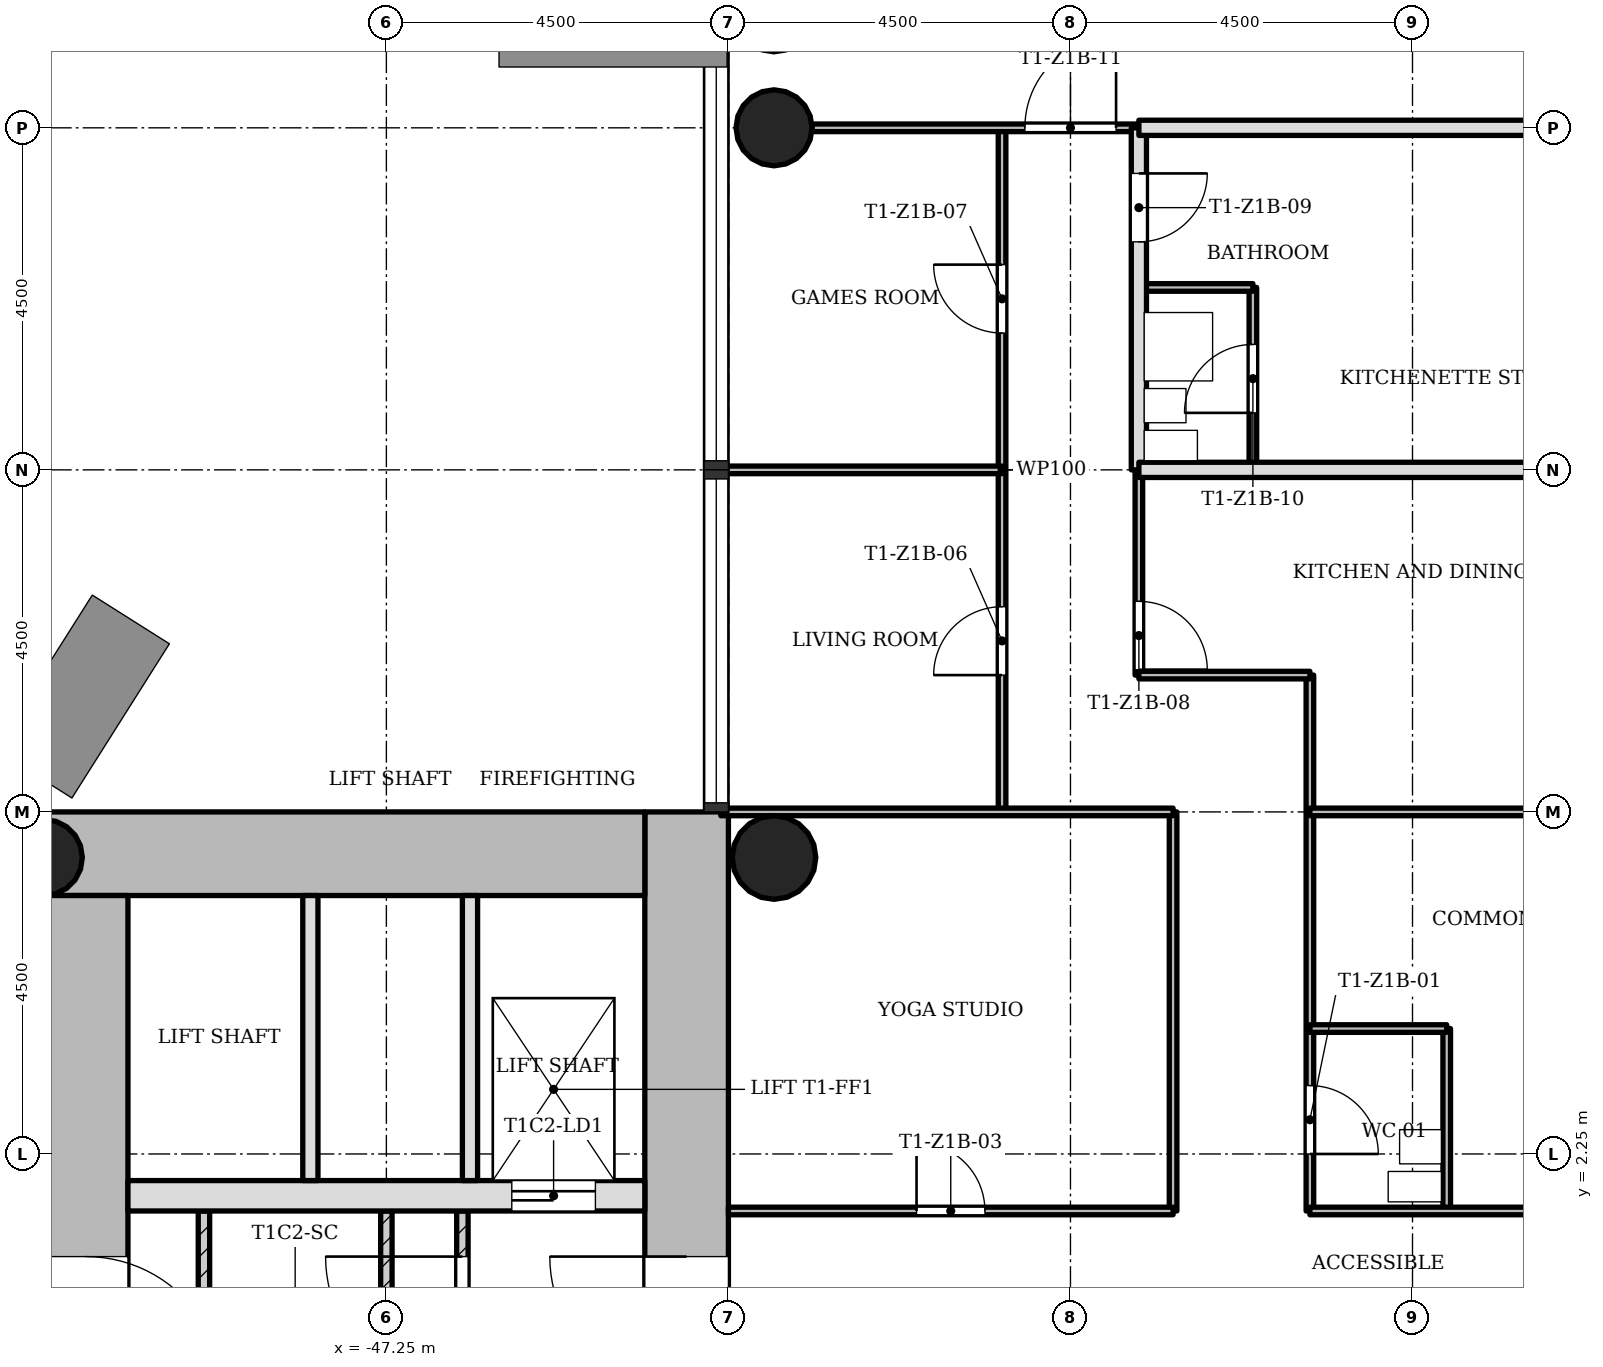
"""IFC4 building model, lengths in metres.
Left out: names, types, materials, properties, quantities, classifications, styles, units other than length and angle.
Written with IfcOpenShell. Run it as: python <this file> out.ifc"""

import sys

from ifc_helpers import new_model, si_unit, direction, frame, frame_2d, origin, origin_2d, place, context, subcontext, project, spatial, rectangle, hollow_circle, extrude, element, fill, save


model = new_model("IFC4")
c1 = context("Model", 3, precision=1e-05, world=origin(), true_north=direction((0.0, 1.0)))
c2 = subcontext(c1, "Body", "Model", "MODEL_VIEW")
j1 = project(units=[si_unit("LENGTHUNIT", "METRE"), si_unit("PLANEANGLEUNIT", "RADIAN")], contexts=[c1])
p1 = place(None, origin())
s1 = spatial("IfcSite", under=j1, at=p1, CompositionType="ELEMENT")
p2 = place(p1, origin())
s2 = spatial("IfcBuilding", under=s1, at=p2, CompositionType="ELEMENT")
p3 = place(p2, frame((0.0, 0.0, 38.1)))
s3 = spatial("IfcBuildingStorey", under=s2, at=p3, CompositionType="ELEMENT", Elevation=38.1)
p4 = place(p3, frame((-43.3, -5.65, 0.0), z_axis=(0.0, 0.0, 1.0), x_axis=(0.0, 1.0, 0.0)))
e1 = element("IfcWall", 1, at=p4, inside=s3, PredefinedType="SHEAR", context=c2, shape_type="SweptSolid", body=[
    extrude(rectangle(XDim=12.4, YDim=1.1, at=frame_2d((6.2, 0.0))), origin(), (0.0, 0.0, 1.0), 3.4),
])
p5 = place(p4, frame((4.75, 0.0, 0.0)))
e2 = element("IfcOpeningElement", 2, at=p5, cuts=e1, PredefinedType="OPENING", context=c2, shape_type="SweptSolid", body=[
    extrude(rectangle(XDim=1.8, YDim=2.1, at=frame_2d((0.9, 1.05))), frame((0.0, 0.56, 0.0), z_axis=(0.0, -1.0, 0.0), x_axis=(1.0, 0.0, 0.0)), (0.0, 0.0, 1.0), 1.12),
])
p6 = place(p3, frame((-43.85, 6.2, 0.0), z_axis=(0.0, 0.0, 1.0), x_axis=(-1.0, 0.0, 0.0)))
e3 = element("IfcWall", 3, at=p6, inside=s3, PredefinedType="SHEAR", context=c2, shape_type="SweptSolid", body=[
    extrude(rectangle(XDim=7.9, YDim=1.1, at=frame_2d((3.95, 0.0))), origin(), (0.0, 0.0, 1.0), 3.4),
])
p7 = place(p3, frame((-51.2, 5.65, 0.0), z_axis=(0.0, 0.0, 1.0), x_axis=(0.0, -1.0, 0.0)))
e4 = element("IfcWall", 4, at=p7, inside=s3, PredefinedType="SHEAR", context=c2, shape_type="SweptSolid", body=[
    extrude(rectangle(XDim=12.4, YDim=1.1, at=frame_2d((6.2, 0.0))), origin(), (0.0, 0.0, 1.0), 3.4),
])
p8 = place(p7, frame((4.75, 0.0, 0.0)))
e5 = element("IfcOpeningElement", 5, at=p8, cuts=e4, PredefinedType="OPENING", context=c2, shape_type="SweptSolid", body=[
    extrude(rectangle(XDim=1.8, YDim=2.1, at=frame_2d((0.9, 1.05))), frame((0.0, 0.56, 0.0), z_axis=(0.0, -1.0, 0.0), x_axis=(1.0, 0.0, 0.0)), (0.0, 0.0, 1.0), 1.12),
])
p9 = place(p3, frame((-50.65, 1.7, 0.0), z_axis=(0.0, 0.0, 1.0), x_axis=(1.0, 0.0, 0.0)))
e6 = element("IfcWall", 6, at=p9, inside=s3, PredefinedType="SHEAR", context=c2, shape_type="SweptSolid", body=[
    extrude(rectangle(XDim=6.8, YDim=0.4, at=frame_2d((3.4, 0.0))), origin(), (0.0, 0.0, 1.0), 3.4),
])
p10 = place(p9, frame((5.05, 0.0, 0.0)))
e7 = element("IfcOpeningElement", 7, at=p10, cuts=e6, PredefinedType="OPENING", context=c2, shape_type="SweptSolid", body=[
    extrude(rectangle(XDim=1.1, YDim=2.1, at=frame_2d((0.55, 1.05))), frame((0.0, 0.21, 0.0), z_axis=(0.0, -1.0, 0.0), x_axis=(1.0, 0.0, 0.0)), (0.0, 0.0, 1.0), 0.42),
])
for number, where, z_axis, x_axis in (
    (8, (-42.15, 15.75, 0.0), (0.0, 0.0, 1.0), (1.0, 0.0, 0.0)),
    (9, (-51.75, 6.15, 0.0), (0.0, 0.0, 1.0), (1.0, 0.0, 0.0)),
):
    element("IfcColumn", number, at=place(p3, frame(where, z_axis=z_axis, x_axis=x_axis)), inside=s3, PredefinedType="COLUMN", context=c2, shape_type="SweptSolid", body=[
        extrude(hollow_circle(Radius=0.5, WallThickness=0.036, at=origin_2d()), origin(), (0.0, 0.0, 1.0), 3.4),
    ])
p11 = place(p3, frame((-42.15, 6.15, 0.0), z_axis=(0.0, 0.0, 1.0), x_axis=(1.0, 0.0, 0.0)))
e10 = element("IfcColumn", 10, at=p11, inside=s3, PredefinedType="COLUMN", context=c2, shape_type="SweptSolid", body=[
    extrude(hollow_circle(Radius=0.55, WallThickness=0.04, at=origin_2d()), origin(), (0.0, 0.0, 1.0), 3.4),
])
p12 = place(p3, frame((-46.25, 1.5, 0.0), z_axis=(0.0, 0.0, 1.0), x_axis=(0.0, -1.0, 0.0)))
e11 = element("IfcWall", 11, at=p12, inside=s3, PredefinedType="PARTITIONING", context=c2, shape_type="SweptSolid", body=[
    extrude(rectangle(XDim=3.0, YDim=0.15, at=frame_2d((1.5, 0.0))), origin(), (0.0, 0.0, 1.0), 3.0),
])
p13 = place(p12, frame((0.6, 0.0, 0.0)))
e12 = element("IfcOpeningElement", 12, at=p13, cuts=e11, PredefinedType="OPENING", context=c2, shape_type="SweptSolid", body=[
    extrude(rectangle(XDim=1.8, YDim=2.1, at=frame_2d((0.9, 1.05))), frame((0.0, 0.085, 0.0), z_axis=(0.0, -1.0, 0.0), x_axis=(1.0, 0.0, 0.0)), (0.0, 0.0, 1.0), 0.17),
])
for number, where, z_axis, x_axis in (
    (13, (-46.15, 5.65, 0.0), (0.0, 0.0, 1.0), (0.0, -1.0, 0.0)),
    (14, (-48.25, 5.65, 0.0), (0.0, 0.0, 1.0), (0.0, -1.0, 0.0)),
):
    element("IfcWall", number, at=place(p3, frame(where, z_axis=z_axis, x_axis=x_axis)), inside=s3, PredefinedType="SOLIDWALL", context=c2, shape_type="SweptSolid", body=[
        extrude(rectangle(XDim=3.75, YDim=0.2, at=frame_2d((1.875, 0.0))), origin(), (0.0, 0.0, 1.0), 3.0),
    ])
for number, where, z_axis, x_axis in (
    (15, (-47.25, 0.3, 0.0), (0.0, 0.0, 1.0), (0.0, 1.0, 0.0)),
    (16, (-49.65, 0.3, 0.0), (0.0, 0.0, 1.0), (0.0, 1.0, 0.0)),
):
    element("IfcWall", number, at=place(p3, frame(where, z_axis=z_axis, x_axis=x_axis)), inside=s3, PredefinedType="PARTITIONING", context=c2, shape_type="SweptSolid", body=[
        extrude(rectangle(XDim=1.2, YDim=0.15, at=frame_2d((0.6, 0.0))), origin(), (0.0, 0.0, 1.0), 3.0),
    ])
p14 = place(p3, frame((-39.15, 6.75, 0.0), z_axis=(0.0, 0.0, 1.0), x_axis=(0.0, 1.0, 0.0)))
e17 = element("IfcWall", 17, at=p14, inside=s3, PredefinedType="PARTITIONING", context=c2, shape_type="SweptSolid", body=[
    extrude(rectangle(XDim=9.0, YDim=0.1, at=frame_2d((4.5, 0.0))), origin(), (0.0, 0.0, 1.0), 3.0),
])
p15 = place(p14, frame((1.8, 0.0, 0.0)))
e18 = element("IfcOpeningElement", 18, at=p15, cuts=e17, PredefinedType="OPENING", context=c2, shape_type="SweptSolid", body=[
    extrude(rectangle(XDim=0.9, YDim=2.1, at=frame_2d((0.45, 1.05))), frame((0.0, 0.06, 0.0), z_axis=(0.0, -1.0, 0.0), x_axis=(1.0, 0.0, 0.0)), (0.0, 0.0, 1.0), 0.12),
])
p16 = place(p14, frame((6.3, 0.0, 0.0)))
e19 = element("IfcOpeningElement", 19, at=p16, cuts=e17, PredefinedType="OPENING", context=c2, shape_type="SweptSolid", body=[
    extrude(rectangle(XDim=0.9, YDim=2.1, at=frame_2d((0.45, 1.05))), frame((0.0, 0.06, 0.0), z_axis=(0.0, -1.0, 0.0), x_axis=(1.0, 0.0, 0.0)), (0.0, 0.0, 1.0), 0.12),
])
p17 = place(p3, frame((-37.35, 8.55, 0.0), z_axis=(0.0, 0.0, 1.0), x_axis=(0.0, 1.0, 0.0)))
e20 = element("IfcWall", 20, at=p17, inside=s3, PredefinedType="PARTITIONING", context=c2, shape_type="SweptSolid", body=[
    extrude(rectangle(XDim=2.7, YDim=0.1, at=frame_2d((1.35, 0.0))), origin(), (0.0, 0.0, 1.0), 3.0),
])
p18 = place(p17, frame((0.07, 0.0, 0.0)))
e21 = element("IfcOpeningElement", 21, at=p18, cuts=e20, PredefinedType="OPENING", context=c2, shape_type="SweptSolid", body=[
    extrude(rectangle(XDim=0.9, YDim=2.1, at=frame_2d((0.45, 1.05))), frame((0.0, 0.06, 0.0), z_axis=(0.0, -1.0, 0.0), x_axis=(1.0, 0.0, 0.0)), (0.0, 0.0, 1.0), 0.12),
])
p19 = place(p3, frame((-37.35, 11.25, 0.0), z_axis=(0.0, 0.0, 1.0), x_axis=(0.0, 1.0, 0.0)))
e22 = element("IfcWall", 22, at=p19, inside=s3, PredefinedType="SOLIDWALL", context=c2, shape_type="SweptSolid", body=[
    extrude(rectangle(XDim=4.5, YDim=0.2, at=frame_2d((2.25, 0.0))), origin(), (0.0, 0.0, 1.0), 3.0),
])
p20 = place(p19, frame((3.0, 0.0, 0.0)))
e23 = element("IfcOpeningElement", 23, at=p20, cuts=e22, PredefinedType="OPENING", context=c2, shape_type="SweptSolid", body=[
    extrude(rectangle(XDim=0.9, YDim=2.1, at=frame_2d((0.45, 1.05))), frame((0.0, 0.11, 0.0), z_axis=(0.0, -1.0, 0.0), x_axis=(1.0, 0.0, 0.0)), (0.0, 0.0, 1.0), 0.22),
])
p21 = place(p3, frame((-36.9, 1.5, 0.0), z_axis=(0.0, 0.0, 1.0), x_axis=(0.0, 1.0, 0.0)))
e24 = element("IfcWall", 24, at=p21, inside=s3, PredefinedType="PARTITIONING", context=c2, shape_type="SweptSolid", body=[
    extrude(rectangle(XDim=5.25, YDim=0.1, at=frame_2d((2.625, 0.0))), origin(), (0.0, 0.0, 1.0), 3.0),
])
p22 = place(p3, frame((-35.85, 11.25, 0.0), z_axis=(0.0, 0.0, 1.0), x_axis=(0.0, 1.0, 0.0)))
e25 = element("IfcWall", 25, at=p22, inside=s3, PredefinedType="PARTITIONING", context=c2, shape_type="SweptSolid", body=[
    extrude(rectangle(XDim=2.4, YDim=0.1, at=frame_2d((1.2, 0.0))), origin(), (0.0, 0.0, 1.0), 3.0),
])
p23 = place(p22, frame((0.75, 0.0, 0.0)))
e26 = element("IfcOpeningElement", 26, at=p23, cuts=e25, PredefinedType="OPENING", context=c2, shape_type="SweptSolid", body=[
    extrude(rectangle(XDim=0.9, YDim=2.1, at=frame_2d((0.45, 1.05))), frame((0.0, 0.06, 0.0), z_axis=(0.0, -1.0, 0.0), x_axis=(1.0, 0.0, 0.0)), (0.0, 0.0, 1.0), 0.12),
])
p24 = place(p3, frame((-35.1, 1.5, 0.0), z_axis=(0.0, 0.0, 1.0), x_axis=(0.0, 1.0, 0.0)))
e27 = element("IfcWall", 27, at=p24, inside=s3, PredefinedType="PARTITIONING", context=c2, shape_type="SweptSolid", body=[
    extrude(rectangle(XDim=7.05, YDim=0.1, at=frame_2d((3.525, 0.0))), origin(), (0.0, 0.0, 1.0), 3.0),
])
p25 = place(p24, frame((0.75, 0.0, 0.0)))
e28 = element("IfcOpeningElement", 28, at=p25, cuts=e27, PredefinedType="OPENING", context=c2, shape_type="SweptSolid", body=[
    extrude(rectangle(XDim=0.9, YDim=2.1, at=frame_2d((0.45, 1.05))), frame((0.0, 0.06, 0.0), z_axis=(0.0, -1.0, 0.0), x_axis=(1.0, 0.0, 0.0)), (0.0, 0.0, 1.0), 0.12),
])
p26 = place(p3, frame((-33.3, 1.5, 0.0), z_axis=(0.0, 0.0, 1.0), x_axis=(0.0, 1.0, 0.0)))
e29 = element("IfcWall", 29, at=p26, inside=s3, PredefinedType="PARTITIONING", context=c2, shape_type="SweptSolid", body=[
    extrude(rectangle(XDim=2.4, YDim=0.1, at=frame_2d((1.2, 0.0))), origin(), (0.0, 0.0, 1.0), 3.0),
])
p27 = place(p3, frame((-42.75, 1.5, 0.0), z_axis=(0.0, 0.0, 1.0), x_axis=(1.0, 0.0, 0.0)))
e30 = element("IfcWall", 30, at=p27, inside=s3, PredefinedType="PARTITIONING", context=c2, shape_type="SweptSolid", body=[
    extrude(rectangle(XDim=5.85, YDim=0.1, at=frame_2d((2.925, 0.0))), origin(), (0.0, 0.0, 1.0), 3.0),
])
p28 = place(p27, frame((2.475, 0.0, 0.0)))
e31 = element("IfcOpeningElement", 31, at=p28, cuts=e30, PredefinedType="OPENING", context=c2, shape_type="SweptSolid", body=[
    extrude(rectangle(XDim=0.9, YDim=2.1, at=frame_2d((0.45, 1.05))), frame((0.0, 0.06, 0.0), z_axis=(0.0, -1.0, 0.0), x_axis=(1.0, 0.0, 0.0)), (0.0, 0.0, 1.0), 0.12),
])
p29 = place(p3, frame((-35.1, 1.5, 0.0), z_axis=(0.0, 0.0, 1.0), x_axis=(1.0, 0.0, 0.0)))
e32 = element("IfcWall", 32, at=p29, inside=s3, PredefinedType="PARTITIONING", context=c2, shape_type="SweptSolid", body=[
    extrude(rectangle(XDim=5.85, YDim=0.1, at=frame_2d((2.925, 0.0))), origin(), (0.0, 0.0, 1.0), 3.0),
])
p30 = place(p29, frame((3.375, 0.0, 0.0)))
e33 = element("IfcOpeningElement", 33, at=p30, cuts=e32, PredefinedType="OPENING", context=c2, shape_type="SweptSolid", body=[
    extrude(rectangle(XDim=0.9, YDim=2.1, at=frame_2d((0.45, 1.05))), frame((0.0, 0.06, 0.0), z_axis=(0.0, -1.0, 0.0), x_axis=(1.0, 0.0, 0.0)), (0.0, 0.0, 1.0), 0.12),
])
p31 = place(p3, frame((-35.1, 3.9, 0.0), z_axis=(0.0, 0.0, 1.0), x_axis=(1.0, 0.0, 0.0)))
e34 = element("IfcWall", 34, at=p31, inside=s3, PredefinedType="PARTITIONING", context=c2, shape_type="SweptSolid", body=[
    extrude(rectangle(XDim=1.8, YDim=0.1, at=frame_2d((0.9, 0.0))), origin(), (0.0, 0.0, 1.0), 3.0),
])
for number, where, z_axis, x_axis in (
    (35, (-42.85, 6.75, 0.0), (0.0, 0.0, 1.0), (1.0, 0.0, 0.0)),
    (36, (-35.1, 6.75, 0.0), (0.0, 0.0, 1.0), (1.0, 0.0, 0.0)),
):
    element("IfcWall", number, at=place(p3, frame(where, z_axis=z_axis, x_axis=x_axis)), inside=s3, PredefinedType="PARTITIONING", context=c2, shape_type="SweptSolid", body=[
        extrude(rectangle(XDim=5.95, YDim=0.1, at=frame_2d((2.975, 0.0))), origin(), (0.0, 0.0, 1.0), 3.0),
    ])
p32 = place(p3, frame((-37.35, 8.55, 0.0), z_axis=(0.0, 0.0, 1.0), x_axis=(1.0, 0.0, 0.0)))
e37 = element("IfcWall", 37, at=p32, inside=s3, PredefinedType="PARTITIONING", context=c2, shape_type="SweptSolid", body=[
    extrude(rectangle(XDim=2.25, YDim=0.1, at=frame_2d((1.125, 0.0))), origin(), (0.0, 0.0, 1.0), 3.0),
])
p33 = place(p3, frame((-42.85, 11.25, 0.0), z_axis=(0.0, 0.0, 1.0), x_axis=(1.0, 0.0, 0.0)))
e38 = element("IfcWall", 38, at=p33, inside=s3, PredefinedType="PARTITIONING", context=c2, shape_type="SweptSolid", body=[
    extrude(rectangle(XDim=3.7, YDim=0.1, at=frame_2d((1.85, 0.0))), origin(), (0.0, 0.0, 1.0), 3.0),
])
p34 = place(p3, frame((-37.35, 11.25, 0.0), z_axis=(0.0, 0.0, 1.0), x_axis=(1.0, 0.0, 0.0)))
e39 = element("IfcWall", 39, at=p34, inside=s3, PredefinedType="SOLIDWALL", context=c2, shape_type="SweptSolid", body=[
    extrude(rectangle(XDim=8.2, YDim=0.2, at=frame_2d((4.1, 0.0))), origin(), (0.0, 0.0, 1.0), 3.0),
])
p35 = place(p3, frame((-37.35, 13.65, 0.0), z_axis=(0.0, 0.0, 1.0), x_axis=(1.0, 0.0, 0.0)))
e40 = element("IfcWall", 40, at=p35, inside=s3, PredefinedType="PARTITIONING", context=c2, shape_type="SweptSolid", body=[
    extrude(rectangle(XDim=1.5, YDim=0.1, at=frame_2d((0.75, 0.0))), origin(), (0.0, 0.0, 1.0), 3.0),
])
p36 = place(p3, frame((-41.65, 15.75, 0.0), z_axis=(0.0, 0.0, 1.0), x_axis=(1.0, 0.0, 0.0)))
e41 = element("IfcWall", 41, at=p36, inside=s3, PredefinedType="PARTITIONING", context=c2, shape_type="SweptSolid", body=[
    extrude(rectangle(XDim=4.3, YDim=0.1, at=frame_2d((2.15, 0.0))), origin(), (0.0, 0.0, 1.0), 3.0),
])
p37 = place(p36, frame((2.8, 0.0, 0.0)))
e42 = element("IfcOpeningElement", 42, at=p37, cuts=e41, PredefinedType="OPENING", context=c2, shape_type="SweptSolid", body=[
    extrude(rectangle(XDim=1.2, YDim=2.1, at=frame_2d((0.6, 1.05))), frame((0.0, 0.06, 0.0), z_axis=(0.0, -1.0, 0.0), x_axis=(1.0, 0.0, 0.0)), (0.0, 0.0, 1.0), 0.12),
])
p38 = place(p3, frame((-37.35, 15.75, 0.0), z_axis=(0.0, 0.0, 1.0), x_axis=(1.0, 0.0, 0.0)))
e43 = element("IfcWall", 43, at=p38, inside=s3, PredefinedType="SOLIDWALL", context=c2, shape_type="SweptSolid", body=[
    extrude(rectangle(XDim=7.0, YDim=0.2, at=frame_2d((3.5, 0.0))), origin(), (0.0, 0.0, 1.0), 3.0),
])
p39 = place(p13, origin())
e44 = element("IfcDoor", 44, at=p39, inside=s3, OperationType="SINGLE_SWING_LEFT", PredefinedType="DOOR", context=c2, shape_type="SweptSolid", body=[
    extrude(rectangle(XDim=1.8, YDim=2.1, at=frame_2d((0.9, 1.05))), frame((0.0, 0.025, 0.0), z_axis=(0.0, -1.0, 0.0), x_axis=(1.0, 0.0, 0.0)), (0.0, 0.0, 1.0), 0.05),
])
fill(e12, e44)
p40 = place(p25, origin())
e45 = element("IfcDoor", 45, at=p40, inside=s3, OperationType="SINGLE_SWING_LEFT", PredefinedType="DOOR", context=c2, shape_type="SweptSolid", body=[
    extrude(rectangle(XDim=0.9, YDim=2.1, at=frame_2d((0.45, 1.05))), frame((0.0, 0.025, 0.0), z_axis=(0.0, -1.0, 0.0), x_axis=(1.0, 0.0, 0.0)), (0.0, 0.0, 1.0), 0.05),
])
fill(e28, e45)
p41 = place(p28, origin())
e46 = element("IfcDoor", 46, at=p41, inside=s3, OperationType="SINGLE_SWING_RIGHT", PredefinedType="DOOR", context=c2, shape_type="SweptSolid", body=[
    extrude(rectangle(XDim=0.9, YDim=2.1, at=frame_2d((0.45, 1.05))), frame((0.0, 0.025, 0.0), z_axis=(0.0, -1.0, 0.0), x_axis=(1.0, 0.0, 0.0)), (0.0, 0.0, 1.0), 0.05),
])
fill(e31, e46)
p42 = place(p15, origin())
e47 = element("IfcDoor", 47, at=p42, inside=s3, OperationType="SINGLE_SWING_RIGHT", PredefinedType="DOOR", context=c2, shape_type="SweptSolid", body=[
    extrude(rectangle(XDim=0.9, YDim=2.1, at=frame_2d((0.45, 1.05))), frame((0.0, 0.025, 0.0), z_axis=(0.0, -1.0, 0.0), x_axis=(1.0, 0.0, 0.0)), (0.0, 0.0, 1.0), 0.05),
])
fill(e18, e47)
p43 = place(p16, origin())
e48 = element("IfcDoor", 48, at=p43, inside=s3, OperationType="SINGLE_SWING_LEFT", PredefinedType="DOOR", context=c2, shape_type="SweptSolid", body=[
    extrude(rectangle(XDim=0.9, YDim=2.1, at=frame_2d((0.45, 1.05))), frame((0.0, 0.025, 0.0), z_axis=(0.0, -1.0, 0.0), x_axis=(1.0, 0.0, 0.0)), (0.0, 0.0, 1.0), 0.05),
])
fill(e19, e48)
p44 = place(p18, origin())
e49 = element("IfcDoor", 49, at=p44, inside=s3, OperationType="SINGLE_SWING_LEFT", PredefinedType="DOOR", context=c2, shape_type="SweptSolid", body=[
    extrude(rectangle(XDim=0.9, YDim=2.1, at=frame_2d((0.45, 1.05))), frame((0.0, 0.025, 0.0), z_axis=(0.0, -1.0, 0.0), x_axis=(1.0, 0.0, 0.0)), (0.0, 0.0, 1.0), 0.05),
])
fill(e21, e49)
p45 = place(p20, origin())
e50 = element("IfcDoor", 50, at=p45, inside=s3, OperationType="SINGLE_SWING_RIGHT", PredefinedType="DOOR", context=c2, shape_type="SweptSolid", body=[
    extrude(rectangle(XDim=0.9, YDim=2.1, at=frame_2d((0.45, 1.05))), frame((0.0, 0.025, 0.0), z_axis=(0.0, -1.0, 0.0), x_axis=(1.0, 0.0, 0.0)), (0.0, 0.0, 1.0), 0.05),
])
fill(e23, e50)
p46 = place(p23, origin())
e51 = element("IfcDoor", 51, at=p46, inside=s3, OperationType="SINGLE_SWING_RIGHT", PredefinedType="DOOR", context=c2, shape_type="SweptSolid", body=[
    extrude(rectangle(XDim=0.9, YDim=2.1, at=frame_2d((0.45, 1.05))), frame((0.0, 0.025, 0.0), z_axis=(0.0, -1.0, 0.0), x_axis=(1.0, 0.0, 0.0)), (0.0, 0.0, 1.0), 0.05),
])
fill(e26, e51)
p47 = place(p37, origin())
e52 = element("IfcDoor", 52, at=p47, inside=s3, OperationType="SINGLE_SWING_LEFT", PredefinedType="DOOR", context=c2, shape_type="SweptSolid", body=[
    extrude(rectangle(XDim=1.2, YDim=2.1, at=frame_2d((0.6, 1.05))), frame((0.0, 0.025, 0.0), z_axis=(0.0, -1.0, 0.0), x_axis=(1.0, 0.0, 0.0)), (0.0, 0.0, 1.0), 0.05),
])
fill(e42, e52)
p48 = place(p10, origin())
e53 = element("IfcDoor", 53, at=p48, inside=s3, OperationType="SLIDING_TO_LEFT", PredefinedType="DOOR", context=c2, shape_type="SweptSolid", body=[
    extrude(rectangle(XDim=1.1, YDim=2.1, at=frame_2d((0.55, 1.05))), frame((0.0, 0.025, 0.0), z_axis=(0.0, -1.0, 0.0), x_axis=(1.0, 0.0, 0.0)), (0.0, 0.0, 1.0), 0.05),
])
fill(e7, e53)
p49 = place(p5, origin())
e54 = element("IfcDoor", 54, at=p49, inside=s3, OperationType="SINGLE_SWING_LEFT", PredefinedType="DOOR", context=c2, shape_type="SweptSolid", body=[
    extrude(rectangle(XDim=1.8, YDim=2.1, at=frame_2d((0.9, 1.05))), frame((0.0, 0.025, 0.0), z_axis=(0.0, -1.0, 0.0), x_axis=(1.0, 0.0, 0.0)), (0.0, 0.0, 1.0), 0.05),
])
fill(e2, e54)
p50 = place(p8, origin())
e55 = element("IfcDoor", 55, at=p50, inside=s3, OperationType="SINGLE_SWING_LEFT", PredefinedType="DOOR", context=c2, shape_type="SweptSolid", body=[
    extrude(rectangle(XDim=1.8, YDim=2.1, at=frame_2d((0.9, 1.05))), frame((0.0, 0.025, 0.0), z_axis=(0.0, -1.0, 0.0), x_axis=(1.0, 0.0, 0.0)), (0.0, 0.0, 1.0), 0.05),
])
fill(e5, e55)
save(model, sys.argv[1])
